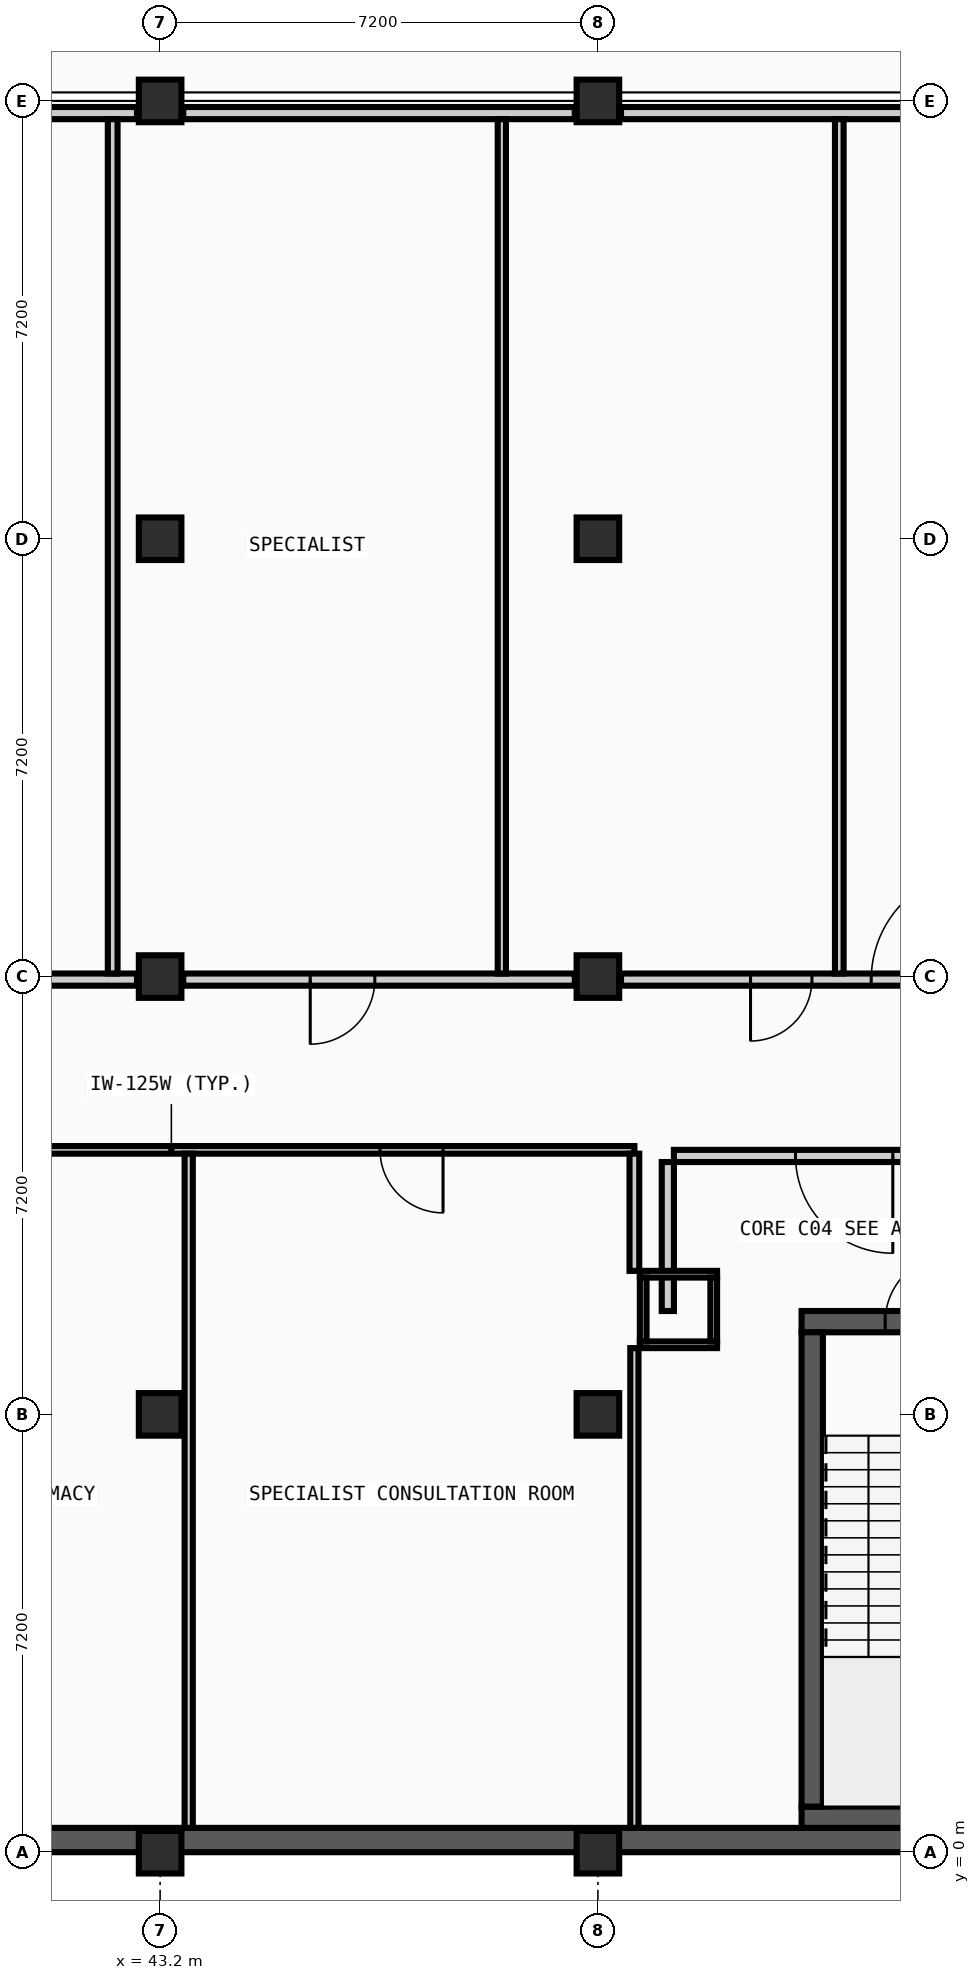
"""IFC4 building model, lengths in metres.
Left out: names, types, materials, properties, quantities, classifications, styles, units other than length and angle.
Written with IfcOpenShell. Run it as: python <this file> out.ifc"""

import sys

from ifc_helpers import new_model, si_unit, direction, frame, frame_2d, origin, origin_2d, place, context, subcontext, project, spatial, rectangle, extrude, element, fill, save


model = new_model("IFC4")
c1 = context("Model", 3, precision=1e-05, world=origin(), true_north=direction((0.0, 1.0)))
c2 = subcontext(c1, "Body", "Model", "MODEL_VIEW")
j1 = project(units=[si_unit("LENGTHUNIT", "METRE"), si_unit("PLANEANGLEUNIT", "RADIAN")], contexts=[c1])
p1 = place(None, origin())
s1 = spatial("IfcSite", under=j1, at=p1, CompositionType="ELEMENT")
p2 = place(p1, origin())
s2 = spatial("IfcBuilding", under=s1, at=p2, CompositionType="ELEMENT")
p3 = place(p2, frame((0.0, 0.0, -4.8)))
s3 = spatial("IfcBuildingStorey", under=s2, at=p3, CompositionType="ELEMENT", Elevation=-4.8)
for number, where, z_axis, x_axis in (
    (1, (43.2, 0.0, 0.0), (0.0, 0.0, 1.0), (1.0, 0.0, 0.0)),
    (2, (43.2, 7.2, 0.0), (0.0, 0.0, 1.0), (1.0, 0.0, 0.0)),
    (3, (43.2, 14.4, 0.0), (0.0, 0.0, 1.0), (1.0, 0.0, 0.0)),
    (4, (43.2, 21.6, 0.0), (0.0, 0.0, 1.0), (1.0, 0.0, 0.0)),
    (5, (43.2, 28.8, 0.0), (0.0, 0.0, 1.0), (1.0, 0.0, 0.0)),
    (6, (50.4, 0.0, 0.0), (0.0, 0.0, 1.0), (1.0, 0.0, 0.0)),
    (7, (50.4, 7.2, 0.0), (0.0, 0.0, 1.0), (1.0, 0.0, 0.0)),
    (8, (50.4, 14.4, 0.0), (0.0, 0.0, 1.0), (1.0, 0.0, 0.0)),
    (9, (50.4, 21.6, 0.0), (0.0, 0.0, 1.0), (1.0, 0.0, 0.0)),
    (10, (50.4, 28.8, 0.0), (0.0, 0.0, 1.0), (1.0, 0.0, 0.0)),
):
    element("IfcColumn", number, at=place(p3, frame(where, z_axis=z_axis, x_axis=x_axis)), inside=s3, PredefinedType="COLUMN", context=c2, shape_type="SweptSolid", body=[
        extrude(rectangle(XDim=0.7, YDim=0.7, at=origin_2d()), origin(), (0.0, 0.0, 1.0), 4.8),
    ])
p4 = place(p3, frame((0.0, 0.2, 0.0), z_axis=(0.0, 0.0, 1.0), x_axis=(1.0, 0.0, 0.0)))
e11 = element("IfcWall", 11, at=p4, inside=s3, PredefinedType="USERDEFINED", context=c2, shape_type="SweptSolid", body=[
    extrude(rectangle(XDim=86.4, YDim=0.4, at=frame_2d((43.2, 0.0))), origin(), (0.0, 0.0, 1.0), 4.545),
])
p5 = place(p3, frame((53.75, 0.575, 0.0), z_axis=(0.0, 0.0, 1.0), x_axis=(1.0, 0.0, 0.0)))
e12 = element("IfcWall", 12, at=p5, inside=s3, PredefinedType="SHEAR", context=c2, shape_type="SweptSolid", body=[
    extrude(rectangle(XDim=3.85, YDim=0.35, at=frame_2d((1.925, 0.0))), origin(), (0.0, 0.0, 1.0), 4.545),
])
p6 = place(p3, frame((53.75, 8.725, 0.0), z_axis=(0.0, 0.0, 1.0), x_axis=(1.0, 0.0, 0.0)))
e13 = element("IfcWall", 13, at=p6, inside=s3, PredefinedType="SHEAR", context=c2, shape_type="SweptSolid", body=[
    extrude(rectangle(XDim=3.85, YDim=0.35, at=frame_2d((1.925, 0.0))), origin(), (0.0, 0.0, 1.0), 4.545),
])
p7 = place(p6, frame((1.375, 0.0, 0.0)))
e14 = element("IfcOpeningElement", 14, at=p7, cuts=e13, PredefinedType="OPENING", context=c2, shape_type="SweptSolid", body=[
    extrude(rectangle(XDim=1.1, YDim=2.15, at=frame_2d((0.55, 1.075))), frame((0.0, 0.185, 0.0), z_axis=(0.0, -1.0, 0.0), x_axis=(1.0, 0.0, 0.0)), (0.0, 0.0, 1.0), 0.37),
])
p8 = place(p3, frame((53.925, 0.75, 0.0), z_axis=(0.0, 0.0, 1.0), x_axis=(0.0, 1.0, 0.0)))
e15 = element("IfcWall", 15, at=p8, inside=s3, PredefinedType="SHEAR", context=c2, shape_type="SweptSolid", body=[
    extrude(rectangle(XDim=7.8, YDim=0.35, at=frame_2d((3.9, 0.0))), origin(), (0.0, 0.0, 1.0), 4.545),
])
p9 = place(p3, frame((51.65, 11.45, 0.0), z_axis=(0.0, 0.0, 1.0), x_axis=(1.0, 0.0, 0.0)))
e16 = element("IfcWall", 16, at=p9, inside=s3, PredefinedType="PARTITIONING", context=c2, shape_type="SweptSolid", body=[
    extrude(rectangle(XDim=5.6, YDim=0.2, at=frame_2d((2.8, 0.0))), origin(), (0.0, 0.0, 1.0), 4.545),
])
p10 = place(p9, frame((2.0, 0.0, 0.0)))
e17 = element("IfcOpeningElement", 17, at=p10, cuts=e16, PredefinedType="OPENING", context=c2, shape_type="SweptSolid", body=[
    extrude(rectangle(XDim=1.6, YDim=2.2, at=frame_2d((0.8, 1.1))), frame((0.0, 0.11, 0.0), z_axis=(0.0, -1.0, 0.0), x_axis=(1.0, 0.0, 0.0)), (0.0, 0.0, 1.0), 0.22),
])
p11 = place(p3, frame((51.55, 8.9, 0.0), z_axis=(0.0, 0.0, 1.0), x_axis=(0.0, 1.0, 0.0)))
e18 = element("IfcWall", 18, at=p11, inside=s3, PredefinedType="PARTITIONING", context=c2, shape_type="SweptSolid", body=[
    extrude(rectangle(XDim=2.45, YDim=0.2, at=frame_2d((1.225, 0.0))), origin(), (0.0, 0.0, 1.0), 4.545),
])
for number, where, z_axis, x_axis in (
    (19, (51.09, 8.345, 0.0), (0.0, 0.0, 1.0), (1.0, 0.0, 0.0)),
    (20, (51.09, 9.505, 0.0), (0.0, 0.0, 1.0), (1.0, 0.0, 0.0)),
):
    element("IfcWall", number, at=place(p3, frame(where, z_axis=z_axis, x_axis=x_axis)), inside=s3, PredefinedType="PARTITIONING", context=c2, shape_type="SweptSolid", body=[
        extrude(rectangle(XDim=1.27, YDim=0.11, at=frame_2d((0.635, 0.0))), origin(), (0.0, 0.0, 1.0), 4.54),
    ])
for number, where, z_axis, x_axis in (
    (21, (51.145, 8.4, 0.0), (0.0, 0.0, 1.0), (0.0, 1.0, 0.0)),
    (22, (52.305, 8.4, 0.0), (0.0, 0.0, 1.0), (0.0, 1.0, 0.0)),
):
    element("IfcWall", number, at=place(p3, frame(where, z_axis=z_axis, x_axis=x_axis)), inside=s3, PredefinedType="PARTITIONING", context=c2, shape_type="SweptSolid", body=[
        extrude(rectangle(XDim=1.05, YDim=0.11, at=frame_2d((0.525, 0.0))), origin(), (0.0, 0.0, 1.0), 4.54),
    ])
p12 = place(p3, frame((35.77, 11.55, 0.0), z_axis=(0.0, 0.0, 1.0), x_axis=(1.0, 0.0, 0.0)))
e23 = element("IfcWall", 23, at=p12, inside=s3, PredefinedType="PARTITIONING", context=c2, shape_type="SweptSolid", body=[
    extrude(rectangle(XDim=15.23, YDim=0.125, at=frame_2d((7.615, 0.0))), origin(), (0.0, 0.0, 1.0), 4.545),
])
p13 = place(p12, frame((1.85, 0.0, 0.0)))
e24 = element("IfcOpeningElement", 24, at=p13, cuts=e23, PredefinedType="OPENING", context=c2, shape_type="SweptSolid", body=[
    extrude(rectangle(XDim=1.0, YDim=2.1, at=frame_2d((0.5, 1.05))), frame((0.0, 0.073, 0.0), z_axis=(0.0, -1.0, 0.0), x_axis=(1.0, 0.0, 0.0)), (0.0, 0.0, 1.0), 0.145),
])
p14 = place(p12, frame((3.75, 0.0, 0.0)))
e25 = element("IfcOpeningElement", 25, at=p14, cuts=e23, PredefinedType="OPENING", context=c2, shape_type="SweptSolid", body=[
    extrude(rectangle(XDim=1.8, YDim=2.3, at=frame_2d((0.9, 1.15))), frame((0.0, 0.073, 0.0), z_axis=(0.0, -1.0, 0.0), x_axis=(1.0, 0.0, 0.0)), (0.0, 0.0, 1.0), 0.145),
])
p15 = place(p12, frame((11.047, 0.0, 0.0)))
e26 = element("IfcOpeningElement", 26, at=p15, cuts=e23, PredefinedType="OPENING", context=c2, shape_type="SweptSolid", body=[
    extrude(rectangle(XDim=1.036, YDim=2.04, at=frame_2d((0.518, 1.02))), frame((0.0, 0.073, 0.0), z_axis=(0.0, -1.0, 0.0), x_axis=(1.0, 0.0, 0.0)), (0.0, 0.0, 1.0), 0.145),
])
p16 = place(p3, frame((36.38, 14.35, 0.0), z_axis=(0.0, 0.0, 1.0), x_axis=(1.0, 0.0, 0.0)))
e27 = element("IfcWall", 27, at=p16, inside=s3, PredefinedType="PARTITIONING", context=c2, shape_type="SweptSolid", body=[
    extrude(rectangle(XDim=6.44, YDim=0.2, at=frame_2d((3.22, 0.0))), origin(), (0.0, 0.0, 1.0), 4.095),
])
p17 = place(p16, frame((2.998, 0.0, 0.0)))
e28 = element("IfcOpeningElement", 28, at=p17, cuts=e27, PredefinedType="OPENING", context=c2, shape_type="SweptSolid", body=[
    extrude(rectangle(XDim=0.984, YDim=2.04, at=frame_2d((0.492, 1.02))), frame((0.0, 0.11, 0.0), z_axis=(0.0, -1.0, 0.0), x_axis=(1.0, 0.0, 0.0)), (0.0, 0.0, 1.0), 0.22),
])
p18 = place(p3, frame((43.58, 14.35, 0.0), z_axis=(0.0, 0.0, 1.0), x_axis=(1.0, 0.0, 0.0)))
e29 = element("IfcWall", 29, at=p18, inside=s3, PredefinedType="PARTITIONING", context=c2, shape_type="SweptSolid", body=[
    extrude(rectangle(XDim=6.44, YDim=0.2, at=frame_2d((3.22, 0.0))), origin(), (0.0, 0.0, 1.0), 4.095),
])
p19 = place(p18, frame((2.089, 0.0, 0.0)))
e30 = element("IfcOpeningElement", 30, at=p19, cuts=e29, PredefinedType="OPENING", context=c2, shape_type="SweptSolid", body=[
    extrude(rectangle(XDim=1.062, YDim=2.04, at=frame_2d((0.531, 1.02))), frame((0.0, 0.11, 0.0), z_axis=(0.0, -1.0, 0.0), x_axis=(1.0, 0.0, 0.0)), (0.0, 0.0, 1.0), 0.22),
])
p20 = place(p3, frame((50.78, 14.35, 0.0), z_axis=(0.0, 0.0, 1.0), x_axis=(1.0, 0.0, 0.0)))
e31 = element("IfcWall", 31, at=p20, inside=s3, PredefinedType="PARTITIONING", context=c2, shape_type="SweptSolid", body=[
    extrude(rectangle(XDim=6.44, YDim=0.2, at=frame_2d((3.22, 0.0))), origin(), (0.0, 0.0, 1.0), 4.095),
])
p21 = place(p20, frame((4.115, 0.0, 0.0)))
e32 = element("IfcOpeningElement", 32, at=p21, cuts=e31, PredefinedType="OPENING", context=c2, shape_type="SweptSolid", body=[
    extrude(rectangle(XDim=1.8, YDim=2.3, at=frame_2d((0.9, 1.15))), frame((0.0, 0.11, 0.0), z_axis=(0.0, -1.0, 0.0), x_axis=(1.0, 0.0, 0.0)), (0.0, 0.0, 1.0), 0.22),
])
p22 = place(p20, frame((2.13, 0.0, 0.0)))
e33 = element("IfcOpeningElement", 33, at=p22, cuts=e31, PredefinedType="OPENING", context=c2, shape_type="SweptSolid", body=[
    extrude(rectangle(XDim=1.01, YDim=2.04, at=frame_2d((0.505, 1.02))), frame((0.0, 0.11, 0.0), z_axis=(0.0, -1.0, 0.0), x_axis=(1.0, 0.0, 0.0)), (0.0, 0.0, 1.0), 0.22),
])
p23 = place(p3, frame((36.38, 28.6, 0.0), z_axis=(0.0, 0.0, 1.0), x_axis=(1.0, 0.0, 0.0)))
e34 = element("IfcWall", 34, at=p23, inside=s3, PredefinedType="PARTITIONING", context=c2, shape_type="SweptSolid", body=[
    extrude(rectangle(XDim=6.44, YDim=0.2, at=frame_2d((3.22, 0.0))), origin(), (0.0, 0.0, 1.0), 4.095),
])
for number, where, z_axis, x_axis in (
    (35, (43.58, 28.6, 0.0), (0.0, 0.0, 1.0), (1.0, 0.0, 0.0)),
    (36, (50.78, 28.6, 0.0), (0.0, 0.0, 1.0), (1.0, 0.0, 0.0)),
):
    element("IfcWall", number, at=place(p3, frame(where, z_axis=z_axis, x_axis=x_axis)), inside=s3, PredefinedType="PARTITIONING", context=c2, shape_type="SweptSolid", body=[
        extrude(rectangle(XDim=6.44, YDim=0.2, at=frame_2d((3.22, 0.0))), origin(), (0.0, 0.0, 1.0), 4.095),
    ])
p24 = place(p3, frame((42.42, 14.45, 0.0), z_axis=(0.0, 0.0, 1.0), x_axis=(0.0, 1.0, 0.0)))
e37 = element("IfcWall", 37, at=p24, inside=s3, PredefinedType="PARTITIONING", context=c2, shape_type="SweptSolid", body=[
    extrude(rectangle(XDim=14.05, YDim=0.16, at=frame_2d((7.025, 0.0))), origin(), (0.0, 0.0, 1.0), 4.545),
])
p25 = place(p3, frame((43.67, 0.4, 0.0), z_axis=(0.0, 0.0, 1.0), x_axis=(0.0, 1.0, 0.0)))
e38 = element("IfcWall", 38, at=p25, inside=s3, PredefinedType="PARTITIONING", context=c2, shape_type="SweptSolid", body=[
    extrude(rectangle(XDim=11.088, YDim=0.135, at=frame_2d((5.544, 0.0))), origin(), (0.0, 0.0, 1.0), 4.545),
])
p26 = place(p3, frame((48.82, 14.45, 0.0), z_axis=(0.0, 0.0, 1.0), x_axis=(0.0, 1.0, 0.0)))
e39 = element("IfcWall", 39, at=p26, inside=s3, PredefinedType="PARTITIONING", context=c2, shape_type="SweptSolid", body=[
    extrude(rectangle(XDim=14.05, YDim=0.135, at=frame_2d((7.025, 0.0))), origin(), (0.0, 0.0, 1.0), 4.545),
])
p27 = place(p3, frame((51.0, 0.4, 0.0), z_axis=(0.0, 0.0, 1.0), x_axis=(0.0, 1.0, 0.0)))
e40 = element("IfcWall", 40, at=p27, inside=s3, PredefinedType="PARTITIONING", context=c2, shape_type="SweptSolid", body=[
    extrude(rectangle(XDim=7.89, YDim=0.135, at=frame_2d((3.945, 0.0))), origin(), (0.0, 0.0, 1.0), 4.545),
])
p28 = place(p3, frame((51.0, 9.56, 0.0), z_axis=(0.0, 0.0, 1.0), x_axis=(0.0, 1.0, 0.0)))
e41 = element("IfcWall", 41, at=p28, inside=s3, PredefinedType="PARTITIONING", context=c2, shape_type="SweptSolid", body=[
    extrude(rectangle(XDim=1.927, YDim=0.16, at=frame_2d((0.964, 0.0))), origin(), (0.0, 0.0, 1.0), 4.545),
])
p29 = place(p3, frame((54.37, 14.45, 0.0), z_axis=(0.0, 0.0, 1.0), x_axis=(0.0, 1.0, 0.0)))
e42 = element("IfcWall", 42, at=p29, inside=s3, PredefinedType="PARTITIONING", context=c2, shape_type="SweptSolid", body=[
    extrude(rectangle(XDim=14.05, YDim=0.142, at=frame_2d((7.025, 0.0))), origin(), (0.0, 0.0, 1.0), 4.545),
])
p30 = place(p7, frame((1.1, 0.0, 0.0), z_axis=(0.0, 0.0, 1.0), x_axis=(-1.0, 0.0, 0.0)))
e43 = element("IfcDoor", 43, at=p30, inside=s3, OperationType="SINGLE_SWING_RIGHT", PredefinedType="DOOR", context=c2, shape_type="SweptSolid", body=[
    extrude(rectangle(XDim=1.1, YDim=2.15, at=frame_2d((0.55, 1.075))), frame((0.0, 0.025, 0.0), z_axis=(0.0, -1.0, 0.0), x_axis=(1.0, 0.0, 0.0)), (0.0, 0.0, 1.0), 0.05),
])
fill(e14, e43)
p31 = place(p10, origin())
e44 = element("IfcDoor", 44, at=p31, inside=s3, OperationType="DOUBLE_DOOR_SINGLE_SWING", PredefinedType="DOOR", context=c2, shape_type="SweptSolid", body=[
    extrude(rectangle(XDim=1.6, YDim=2.2, at=frame_2d((0.8, 1.1))), frame((0.0, 0.025, 0.0), z_axis=(0.0, -1.0, 0.0), x_axis=(1.0, 0.0, 0.0)), (0.0, 0.0, 1.0), 0.05),
])
fill(e17, e44)
p32 = place(p21, frame((1.8, 0.0, 0.0), z_axis=(0.0, 0.0, 1.0), x_axis=(-1.0, 0.0, 0.0)))
e45 = element("IfcDoor", 45, at=p32, inside=s3, OperationType="DOUBLE_DOOR_SINGLE_SWING", PredefinedType="DOOR", context=c2, shape_type="SweptSolid", body=[
    extrude(rectangle(XDim=1.8, YDim=2.3, at=frame_2d((0.9, 1.15))), frame((0.0, 0.025, 0.0), z_axis=(0.0, -1.0, 0.0), x_axis=(1.0, 0.0, 0.0)), (0.0, 0.0, 1.0), 0.05),
])
fill(e32, e45)
p33 = place(p22, frame((1.01, 0.0, 0.0), z_axis=(0.0, 0.0, 1.0), x_axis=(-1.0, 0.0, 0.0)))
e46 = element("IfcDoor", 46, at=p33, inside=s3, OperationType="SINGLE_SWING_LEFT", PredefinedType="DOOR", context=c2, shape_type="SweptSolid", body=[
    extrude(rectangle(XDim=1.01, YDim=2.04, at=frame_2d((0.505, 1.02))), frame((0.0, 0.025, 0.0), z_axis=(0.0, -1.0, 0.0), x_axis=(1.0, 0.0, 0.0)), (0.0, 0.0, 1.0), 0.05),
])
fill(e33, e46)
p34 = place(p15, origin())
e47 = element("IfcDoor", 47, at=p34, inside=s3, OperationType="SINGLE_SWING_RIGHT", PredefinedType="DOOR", context=c2, shape_type="SweptSolid", body=[
    extrude(rectangle(XDim=1.036, YDim=2.04, at=frame_2d((0.518, 1.02))), frame((0.0, 0.025, 0.0), z_axis=(0.0, -1.0, 0.0), x_axis=(1.0, 0.0, 0.0)), (0.0, 0.0, 1.0), 0.05),
])
fill(e26, e47)
p35 = place(p19, frame((1.062, 0.0, 0.0), z_axis=(0.0, 0.0, 1.0), x_axis=(-1.0, 0.0, 0.0)))
e48 = element("IfcDoor", 48, at=p35, inside=s3, OperationType="SINGLE_SWING_LEFT", PredefinedType="DOOR", context=c2, shape_type="SweptSolid", body=[
    extrude(rectangle(XDim=1.062, YDim=2.04, at=frame_2d((0.531, 1.02))), frame((0.0, 0.025, 0.0), z_axis=(0.0, -1.0, 0.0), x_axis=(1.0, 0.0, 0.0)), (0.0, 0.0, 1.0), 0.05),
])
fill(e30, e48)
save(model, sys.argv[1])
